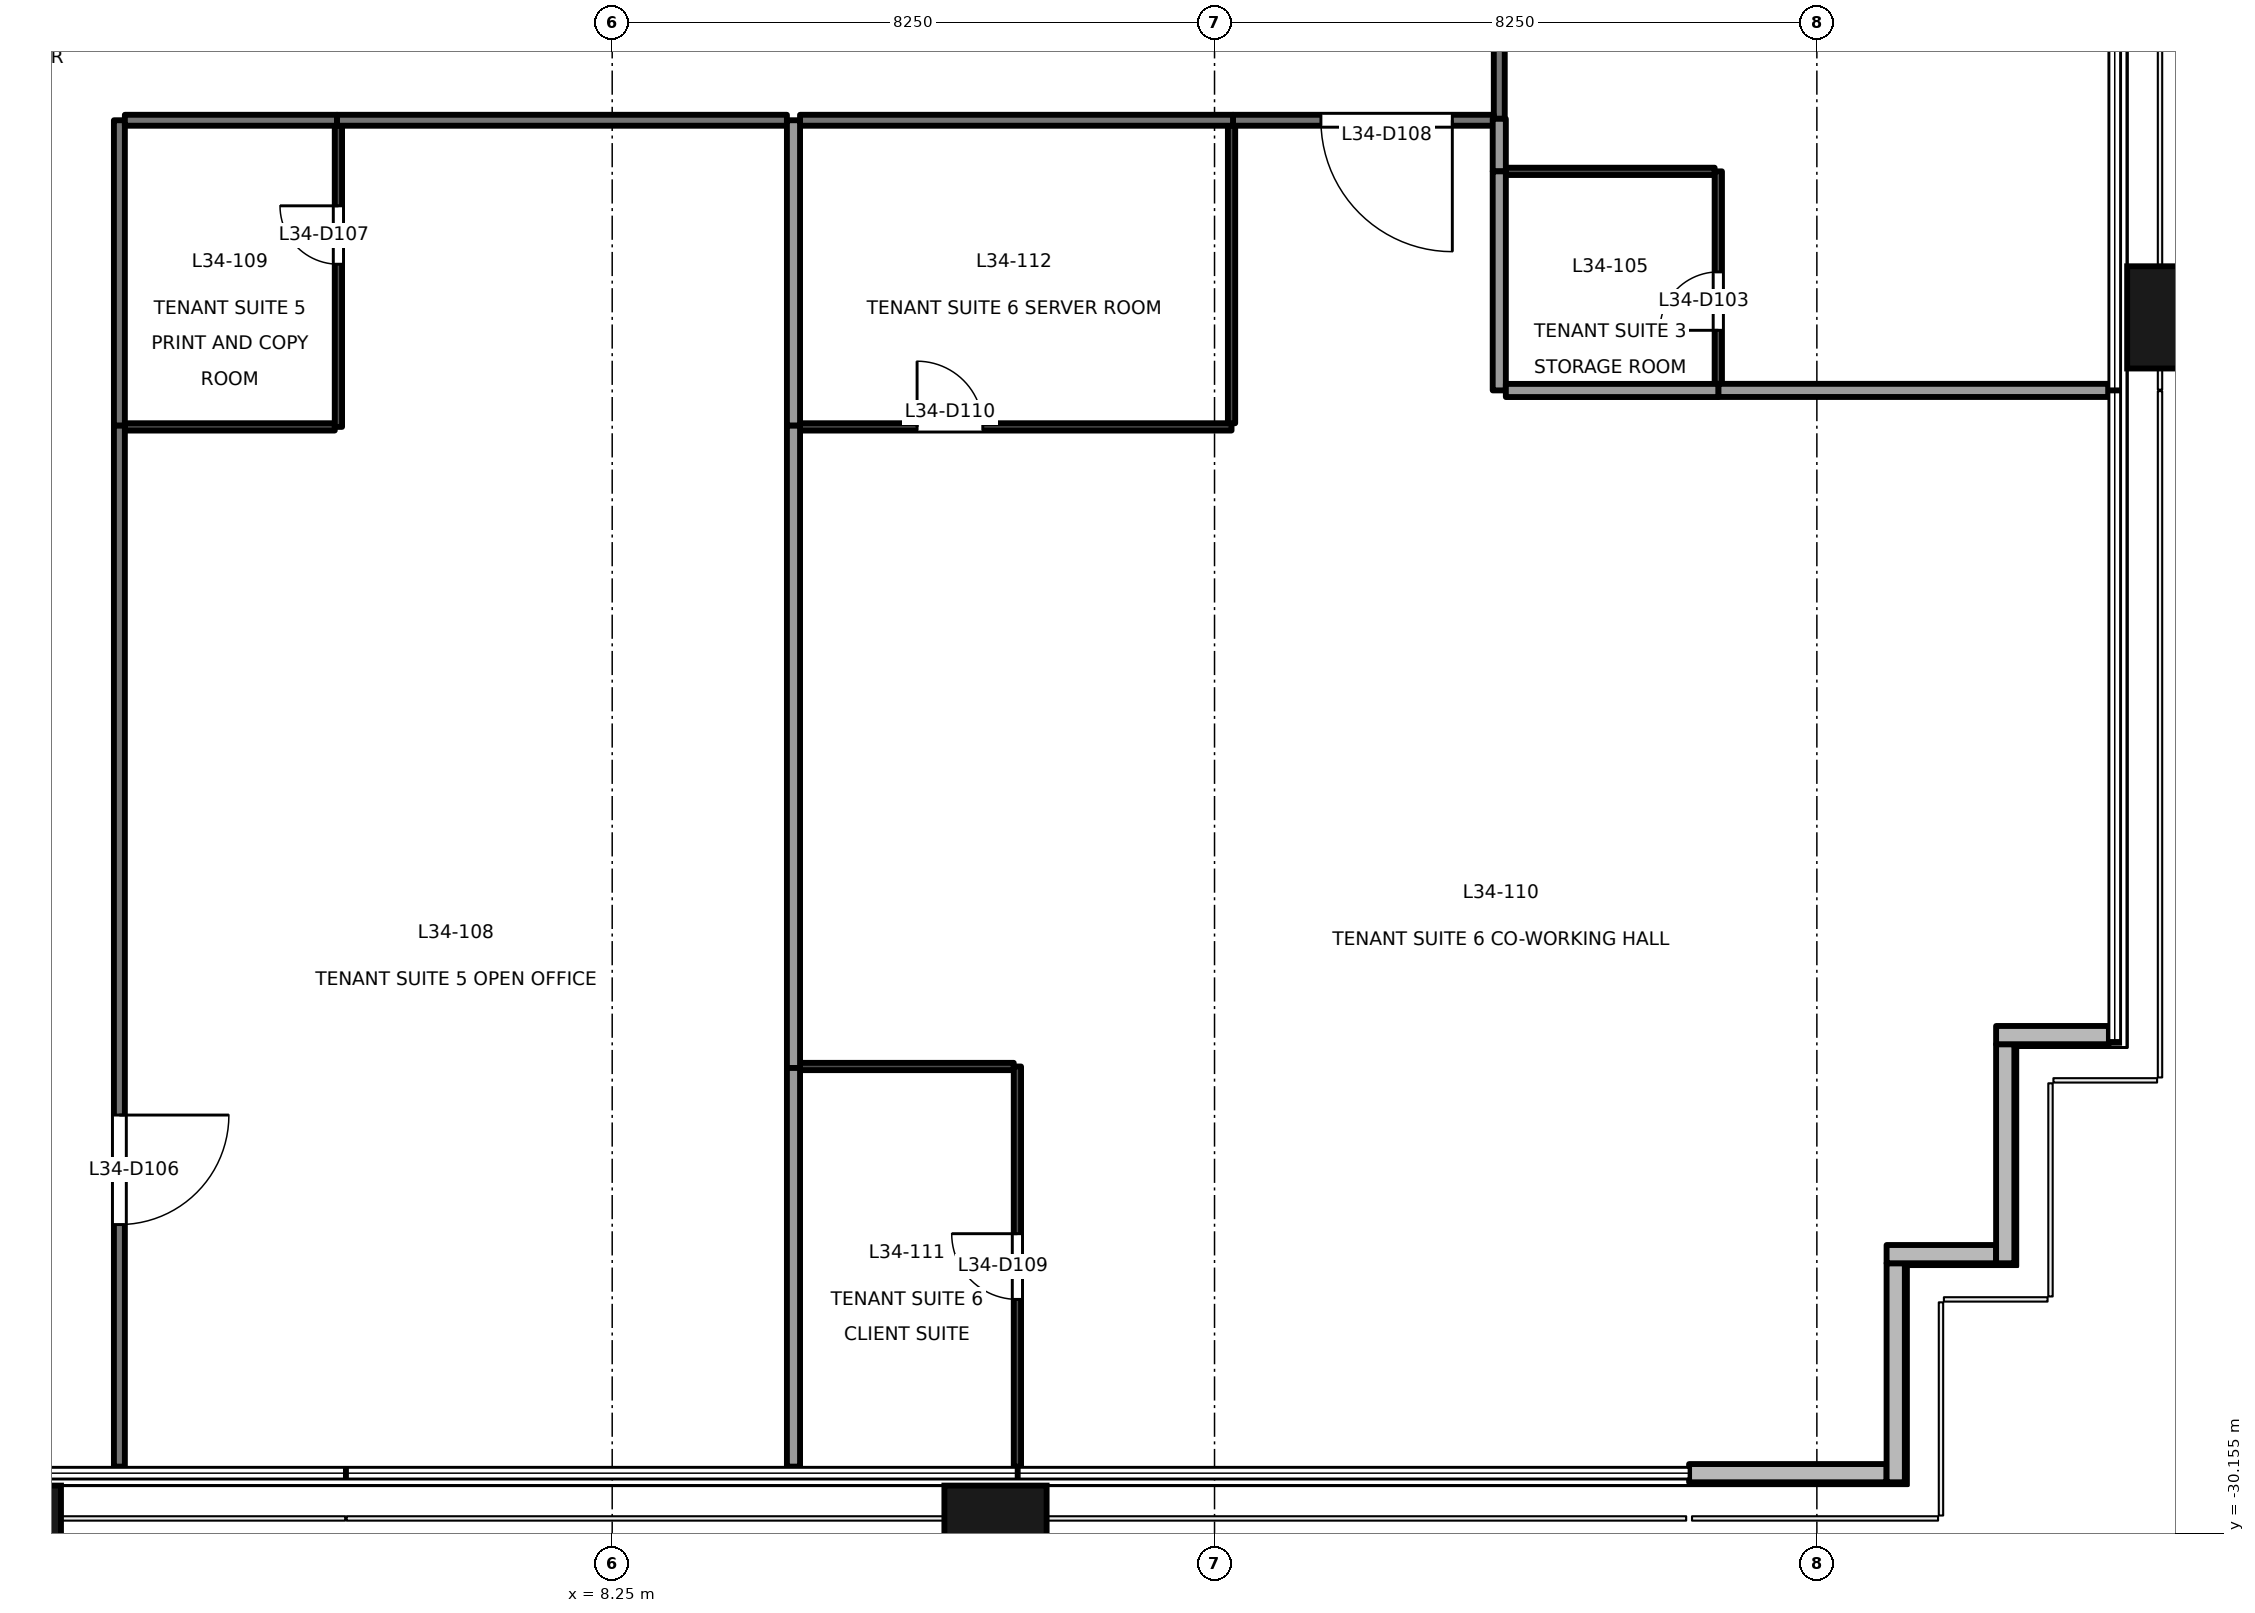
"""IFC4 building model, lengths in metres.
Left out: names, types, materials, properties, quantities, classifications, styles, units other than length and angle.
Written with IfcOpenShell. Run it as: python <this file> out.ifc"""

import sys

from ifc_helpers import new_model, si_unit, direction, frame, frame_2d, origin, origin_2d, place, context, subcontext, project, spatial, rectangle, extrude, element, fill, save


model = new_model("IFC4")
c1 = context("Model", 3, precision=1e-05, world=origin(), true_north=direction((0.0, 1.0)))
c2 = subcontext(c1, "Body", "Model", "MODEL_VIEW")
j1 = project(units=[si_unit("LENGTHUNIT", "METRE"), si_unit("PLANEANGLEUNIT", "RADIAN")], contexts=[c1])
p1 = place(None, origin())
s1 = spatial("IfcSite", under=j1, at=p1, CompositionType="ELEMENT")
p2 = place(p1, origin())
s2 = spatial("IfcBuilding", under=s1, at=p2, CompositionType="ELEMENT")
p3 = place(p2, frame((0.0, 0.0, 150.1)))
s3 = spatial("IfcBuildingStorey", under=s2, at=p3, CompositionType="ELEMENT", Elevation=150.1)
for number, where, z_axis, x_axis in (
    (1, (0.0, -30.4, -0.2), (0.0, 0.0, 1.0), (1.0, 0.0, 0.0)),
    (2, (13.5, -30.4, -0.2), (0.0, 0.0, 1.0), (1.0, 0.0, 0.0)),
    (3, (29.9, -13.5, -0.2), (0.0, 0.0, 1.0), (0.0, 1.0, 0.0)),
):
    element("IfcColumn", number, at=place(p3, frame(where, z_axis=z_axis, x_axis=x_axis)), inside=s3, PredefinedType="COLUMN", context=c2, shape_type="SweptSolid", body=[
        extrude(rectangle(XDim=1.4, YDim=1.8, at=origin_2d()), origin(), (0.0, 0.0, 1.0), 4.0),
    ])
p4 = place(p3, frame((23.0, -29.33, 0.0), z_axis=(0.0, 0.0, 1.0), x_axis=(1.0, 0.0, 0.0)))
e4 = element("IfcWall", 4, at=p4, inside=s3, PredefinedType="SOLIDWALL", context=c2, shape_type="SweptSolid", body=[
    extrude(rectangle(XDim=2.705, YDim=0.25, at=frame_2d((1.353, 0.0))), origin(), (0.0, 0.0, 1.0), 3.8),
])
p5 = place(p3, frame((25.83, -29.455, 0.0), z_axis=(0.0, 0.0, 1.0), x_axis=(0.0, 1.0, 0.0)))
e5 = element("IfcWall", 5, at=p5, inside=s3, PredefinedType="SOLIDWALL", context=c2, shape_type="SweptSolid", body=[
    extrude(rectangle(XDim=3.0, YDim=0.25, at=frame_2d((1.5, 0.0))), origin(), (0.0, 0.0, 1.0), 3.8),
])
p6 = place(p3, frame((25.705, -26.33, 0.0), z_axis=(0.0, 0.0, 1.0), x_axis=(1.0, 0.0, 0.0)))
e6 = element("IfcWall", 6, at=p6, inside=s3, PredefinedType="SOLIDWALL", context=c2, shape_type="SweptSolid", body=[
    extrude(rectangle(XDim=1.5, YDim=0.25, at=frame_2d((0.75, 0.0))), origin(), (0.0, 0.0, 1.0), 3.8),
])
p7 = place(p3, frame((27.33, -26.455, 0.0), z_axis=(0.0, 0.0, 1.0), x_axis=(0.0, 1.0, 0.0)))
e7 = element("IfcWall", 7, at=p7, inside=s3, PredefinedType="SOLIDWALL", context=c2, shape_type="SweptSolid", body=[
    extrude(rectangle(XDim=3.0, YDim=0.25, at=frame_2d((1.5, 0.0))), origin(), (0.0, 0.0, 1.0), 3.8),
])
p8 = place(p3, frame((27.205, -23.33, 0.0), z_axis=(0.0, 0.0, 1.0), x_axis=(1.0, 0.0, 0.0)))
e8 = element("IfcWall", 8, at=p8, inside=s3, PredefinedType="SOLIDWALL", context=c2, shape_type="SweptSolid", body=[
    extrude(rectangle(XDim=1.545, YDim=0.25, at=frame_2d((0.772, 0.0))), origin(), (0.0, 0.0, 1.0), 3.8),
])
p9 = place(p3, frame((20.4, -5.59, 0.0), z_axis=(0.0, 0.0, 1.0), x_axis=(0.0, -1.0, 0.0)))
e9 = element("IfcWall", 9, at=p9, inside=s3, PredefinedType="PARTITIONING", context=c2, shape_type="SweptSolid", body=[
    extrude(rectangle(XDim=5.19, YDim=0.15, at=frame_2d((2.595, 0.0))), origin(), (0.0, 0.0, 1.0), 3.8),
])
p10 = place(p9, frame((1.198, 0.0, 0.0)))
e10 = element("IfcOpeningElement", 10, at=p10, cuts=e9, PredefinedType="OPENING", context=c2, shape_type="SweptSolid", body=[
    extrude(rectangle(XDim=0.9, YDim=2.1, at=frame_2d((0.45, 1.05))), frame((0.0, 0.085, 0.0), z_axis=(0.0, -1.0, 0.0), x_axis=(1.0, 0.0, 0.0)), (0.0, 0.0, 1.0), 0.171),
])
p11 = place(p3, frame((1.5, -14.98, 0.0), z_axis=(0.0, 0.0, 1.0), x_axis=(0.0, -1.0, 0.0)))
e11 = element("IfcWall", 11, at=p11, inside=s3, PredefinedType="PARTITIONING", context=c2, shape_type="SweptSolid", body=[
    extrude(rectangle(XDim=14.26, YDim=0.15, at=frame_2d((7.13, 0.0))), origin(), (0.0, 0.0, 1.0), 3.8),
])
p12 = place(p11, frame((9.445, 0.0, 0.0)))
e12 = element("IfcOpeningElement", 12, at=p12, cuts=e11, PredefinedType="OPENING", context=c2, shape_type="SweptSolid", body=[
    extrude(rectangle(XDim=1.5, YDim=2.1, at=frame_2d((0.75, 1.05))), frame((0.0, 0.085, 0.0), z_axis=(0.0, -1.0, 0.0), x_axis=(1.0, 0.0, 0.0)), (0.0, 0.0, 1.0), 0.171),
])
p13 = place(p3, frame((10.643, -10.8, 0.0), z_axis=(0.0, 0.0, 1.0), x_axis=(-1.0, 0.0, 0.0)))
e13 = element("IfcWall", 13, at=p13, inside=s3, PredefinedType="PARTITIONING", context=c2, shape_type="SweptSolid", body=[
    extrude(rectangle(XDim=6.163, YDim=0.15, at=frame_2d((3.082, 0.0))), origin(), (0.0, 0.0, 1.0), 2.9),
])
p14 = place(p3, frame((1.5, -10.8, 0.0), z_axis=(0.0, 0.0, 1.0), x_axis=(0.0, -1.0, 0.0)))
e14 = element("IfcWall", 14, at=p14, inside=s3, PredefinedType="PARTITIONING", context=c2, shape_type="SweptSolid", body=[
    extrude(rectangle(XDim=4.18, YDim=0.15, at=frame_2d((2.09, 0.0))), origin(), (0.0, 0.0, 1.0), 3.8),
])
p15 = place(p3, frame((4.48, -10.8, 0.0), z_axis=(0.0, 0.0, 1.0), x_axis=(-1.0, 0.0, 0.0)))
e15 = element("IfcWall", 15, at=p15, inside=s3, PredefinedType="PARTITIONING", context=c2, shape_type="SweptSolid", body=[
    extrude(rectangle(XDim=2.905, YDim=0.15, at=frame_2d((1.453, 0.0))), origin(), (0.0, 0.0, 1.0), 2.9),
])
p16 = place(p3, frame((20.325, -10.8, 0.0), z_axis=(0.0, 0.0, 1.0), x_axis=(-1.0, 0.0, 0.0)))
e16 = element("IfcWall", 16, at=p16, inside=s3, PredefinedType="PARTITIONING", context=c2, shape_type="SweptSolid", body=[
    extrude(rectangle(XDim=3.572, YDim=0.15, at=frame_2d((1.786, 0.0))), origin(), (0.0, 0.0, 1.0), 3.8),
])
p17 = place(p16, frame((0.568, 0.0, 0.0)))
e17 = element("IfcOpeningElement", 17, at=p17, cuts=e16, PredefinedType="OPENING", context=c2, shape_type="SweptSolid", body=[
    extrude(rectangle(XDim=1.8, YDim=2.1, at=frame_2d((0.9, 1.05))), frame((0.0, 0.085, 0.0), z_axis=(0.0, -1.0, 0.0), x_axis=(1.0, 0.0, 0.0)), (0.0, 0.0, 1.0), 0.171),
])
p18 = place(p3, frame((16.753, -10.8, 0.0), z_axis=(0.0, 0.0, 1.0), x_axis=(-1.0, 0.0, 0.0)))
e18 = element("IfcWall", 18, at=p18, inside=s3, PredefinedType="PARTITIONING", context=c2, shape_type="SweptSolid", body=[
    extrude(rectangle(XDim=5.93, YDim=0.15, at=frame_2d((2.965, 0.0))), origin(), (0.0, 0.0, 1.0), 2.9),
])
p19 = place(p3, frame((23.35, -11.5, 0.0), z_axis=(0.0, 0.0, 1.0), x_axis=(-1.0, 0.0, 0.0)))
e19 = element("IfcWall", 19, at=p19, inside=s3, PredefinedType="PARTITIONING", context=c2, shape_type="SweptSolid", body=[
    extrude(rectangle(XDim=2.86, YDim=0.1, at=frame_2d((1.43, 0.0))), origin(), (0.0, 0.0, 1.0), 3.8),
])
p20 = place(p3, frame((23.4, -14.41, 0.0), z_axis=(0.0, 0.0, 1.0), x_axis=(0.0, 1.0, 0.0)))
e20 = element("IfcWall", 20, at=p20, inside=s3, PredefinedType="PARTITIONING", context=c2, shape_type="SweptSolid", body=[
    extrude(rectangle(XDim=2.91, YDim=0.1, at=frame_2d((1.455, 0.0))), origin(), (0.0, 0.0, 1.0), 3.8),
])
p21 = place(p20, frame((0.733, 0.0, 0.0)))
e21 = element("IfcOpeningElement", 21, at=p21, cuts=e20, PredefinedType="OPENING", context=c2, shape_type="SweptSolid", body=[
    extrude(rectangle(XDim=0.8, YDim=2.1, at=frame_2d((0.4, 1.05))), frame((0.0, 0.061, 0.0), z_axis=(0.0, -1.0, 0.0), x_axis=(1.0, 0.0, 0.0)), (0.0, 0.0, 1.0), 0.121),
])
p22 = place(p3, frame((20.4, -11.5, 0.0), z_axis=(0.0, 0.0, 1.0), x_axis=(0.0, 1.0, 0.0)))
e22 = element("IfcWall", 22, at=p22, inside=s3, PredefinedType="PARTITIONING", context=c2, shape_type="SweptSolid", body=[
    extrude(rectangle(XDim=0.72, YDim=0.18, at=frame_2d((0.36, 0.0))), origin(), (0.0, 0.0, 1.0), 3.8),
])
p23 = place(p3, frame((28.74, -14.5, 0.0), z_axis=(0.0, 0.0, 1.0), x_axis=(-1.0, 0.0, 0.0)))
e23 = element("IfcWall", 23, at=p23, inside=s3, PredefinedType="PARTITIONING", context=c2, shape_type="SweptSolid", body=[
    extrude(rectangle(XDim=5.34, YDim=0.18, at=frame_2d((2.67, 0.0))), origin(), (0.0, 0.0, 1.0), 3.8),
])
p24 = place(p3, frame((20.4, -14.5, 0.0), z_axis=(0.0, 0.0, 1.0), x_axis=(0.0, 1.0, 0.0)))
e24 = element("IfcWall", 24, at=p24, inside=s3, PredefinedType="PARTITIONING", context=c2, shape_type="SweptSolid", body=[
    extrude(rectangle(XDim=3.0, YDim=0.18, at=frame_2d((1.5, 0.0))), origin(), (0.0, 0.0, 1.0), 3.8),
])
p25 = place(p3, frame((23.4, -14.501, 0.0), z_axis=(0.0, 0.0, 1.0), x_axis=(-1.0, 0.0, 0.0)))
e25 = element("IfcWall", 25, at=p25, inside=s3, PredefinedType="PARTITIONING", context=c2, shape_type="SweptSolid", body=[
    extrude(rectangle(XDim=2.91, YDim=0.18, at=frame_2d((1.455, 0.0))), origin(), (0.0, 0.0, 1.0), 3.8),
])
p26 = place(p3, frame((1.575, -15.0, 0.0), z_axis=(0.0, 0.0, 1.0), x_axis=(1.0, 0.0, 0.0)))
e26 = element("IfcWall", 26, at=p26, inside=s3, PredefinedType="PARTITIONING", context=c2, shape_type="SweptSolid", body=[
    extrude(rectangle(XDim=2.875, YDim=0.1, at=frame_2d((1.438, 0.0))), origin(), (0.0, 0.0, 1.0), 2.9),
])
p27 = place(p3, frame((4.5, -15.0, 0.0), z_axis=(0.0, 0.0, 1.0), x_axis=(0.0, 1.0, 0.0)))
e27 = element("IfcWall", 27, at=p27, inside=s3, PredefinedType="PARTITIONING", context=c2, shape_type="SweptSolid", body=[
    extrude(rectangle(XDim=4.125, YDim=0.1, at=frame_2d((2.062, 0.0))), origin(), (0.0, 0.0, 1.0), 2.9),
])
p28 = place(p27, frame((2.228, 0.0, 0.0)))
e28 = element("IfcOpeningElement", 28, at=p28, cuts=e27, PredefinedType="OPENING", context=c2, shape_type="SweptSolid", body=[
    extrude(rectangle(XDim=0.8, YDim=2.1, at=frame_2d((0.4, 1.05))), frame((0.0, 0.061, 0.0), z_axis=(0.0, -1.0, 0.0), x_axis=(1.0, 0.0, 0.0)), (0.0, 0.0, 1.0), 0.121),
])
p29 = place(p3, frame((10.733, -14.98, 0.0), z_axis=(0.0, 0.0, 1.0), x_axis=(0.0, -1.0, 0.0)))
e29 = element("IfcWall", 29, at=p29, inside=s3, PredefinedType="PARTITIONING", context=c2, shape_type="SweptSolid", body=[
    extrude(rectangle(XDim=8.8, YDim=0.18, at=frame_2d((4.4, 0.0))), origin(), (0.0, 0.0, 1.0), 3.8),
])
p30 = place(p3, frame((10.733, -23.78, 0.0), z_axis=(0.0, 0.0, 1.0), x_axis=(0.0, -1.0, 0.0)))
e30 = element("IfcWall", 30, at=p30, inside=s3, PredefinedType="PARTITIONING", context=c2, shape_type="SweptSolid", body=[
    extrude(rectangle(XDim=5.46, YDim=0.18, at=frame_2d((2.73, 0.0))), origin(), (0.0, 0.0, 1.0), 3.8),
])
p31 = place(p3, frame((10.733, -10.8, 0.0), z_axis=(0.0, 0.0, 1.0), x_axis=(0.0, -1.0, 0.0)))
e31 = element("IfcWall", 31, at=p31, inside=s3, PredefinedType="PARTITIONING", context=c2, shape_type="SweptSolid", body=[
    extrude(rectangle(XDim=4.18, YDim=0.18, at=frame_2d((2.09, 0.0))), origin(), (0.0, 0.0, 1.0), 3.8),
])
p32 = place(p3, frame((13.75, -23.76, 0.0), z_axis=(0.0, 0.0, 1.0), x_axis=(-1.0, 0.0, 0.0)))
e32 = element("IfcWall", 32, at=p32, inside=s3, PredefinedType="PARTITIONING", context=c2, shape_type="SweptSolid", body=[
    extrude(rectangle(XDim=2.927, YDim=0.1, at=frame_2d((1.463, 0.0))), origin(), (0.0, 0.0, 1.0), 2.9),
])
p33 = place(p3, frame((13.8, -29.24, 0.0), z_axis=(0.0, 0.0, 1.0), x_axis=(0.0, 1.0, 0.0)))
e33 = element("IfcWall", 33, at=p33, inside=s3, PredefinedType="PARTITIONING", context=c2, shape_type="SweptSolid", body=[
    extrude(rectangle(XDim=5.48, YDim=0.1, at=frame_2d((2.74, 0.0))), origin(), (0.0, 0.0, 1.0), 3.8),
])
p34 = place(p33, frame((2.29, 0.0, 0.0)))
e34 = element("IfcOpeningElement", 34, at=p34, cuts=e33, PredefinedType="OPENING", context=c2, shape_type="SweptSolid", body=[
    extrude(rectangle(XDim=0.9, YDim=2.1, at=frame_2d((0.45, 1.05))), frame((0.0, 0.061, 0.0), z_axis=(0.0, -1.0, 0.0), x_axis=(1.0, 0.0, 0.0)), (0.0, 0.0, 1.0), 0.121),
])
p35 = place(p3, frame((10.823, -15.0, 0.0), z_axis=(0.0, 0.0, 1.0), x_axis=(1.0, 0.0, 0.0)))
e35 = element("IfcWall", 35, at=p35, inside=s3, PredefinedType="PARTITIONING", context=c2, shape_type="SweptSolid", body=[
    extrude(rectangle(XDim=5.91, YDim=0.1, at=frame_2d((2.955, 0.0))), origin(), (0.0, 0.0, 1.0), 2.9),
])
p36 = place(p35, frame((1.603, 0.0, 0.0)))
e36 = element("IfcOpeningElement", 36, at=p36, cuts=e35, PredefinedType="OPENING", context=c2, shape_type="SweptSolid", body=[
    extrude(rectangle(XDim=0.9, YDim=2.1, at=frame_2d((0.45, 1.05))), frame((0.0, 0.061, 0.0), z_axis=(0.0, -1.0, 0.0), x_axis=(1.0, 0.0, 0.0)), (0.0, 0.0, 1.0), 0.121),
])
p37 = place(p3, frame((16.733, -14.95, 0.0), z_axis=(0.0, 0.0, 1.0), x_axis=(0.0, 1.0, 0.0)))
e37 = element("IfcWall", 37, at=p37, inside=s3, PredefinedType="PARTITIONING", context=c2, shape_type="SweptSolid", body=[
    extrude(rectangle(XDim=4.075, YDim=0.1, at=frame_2d((2.038, 0.0))), origin(), (0.0, 0.0, 1.0), 3.8),
])
p38 = place(p21, origin())
e38 = element("IfcDoor", 38, at=p38, inside=s3, OperationType="SINGLE_SWING_LEFT", PredefinedType="DOOR", context=c2, shape_type="SweptSolid", body=[
    extrude(rectangle(XDim=0.8, YDim=2.1, at=frame_2d((0.4, 1.05))), frame((0.0, 0.025, 0.0), z_axis=(0.0, -1.0, 0.0), x_axis=(1.0, 0.0, 0.0)), (0.0, 0.0, 1.0), 0.05),
])
fill(e21, e38)
p39 = place(p12, origin())
e39 = element("IfcDoor", 39, at=p39, inside=s3, OperationType="DOUBLE_DOOR_SINGLE_SWING", PredefinedType="DOOR", context=c2, shape_type="SweptSolid", body=[
    extrude(rectangle(XDim=1.5, YDim=2.1, at=frame_2d((0.75, 1.05))), frame((0.0, 0.025, 0.0), z_axis=(0.0, -1.0, 0.0), x_axis=(1.0, 0.0, 0.0)), (0.0, 0.0, 1.0), 0.05),
])
fill(e12, e39)
p40 = place(p28, origin())
e40 = element("IfcDoor", 40, at=p40, inside=s3, OperationType="SINGLE_SWING_RIGHT", PredefinedType="DOOR", context=c2, shape_type="SweptSolid", body=[
    extrude(rectangle(XDim=0.8, YDim=2.1, at=frame_2d((0.4, 1.05))), frame((0.0, 0.025, 0.0), z_axis=(0.0, -1.0, 0.0), x_axis=(1.0, 0.0, 0.0)), (0.0, 0.0, 1.0), 0.05),
])
fill(e28, e40)
p41 = place(p17, origin())
e41 = element("IfcDoor", 41, at=p41, inside=s3, OperationType="DOUBLE_DOOR_SINGLE_SWING", PredefinedType="DOOR", context=c2, shape_type="SweptSolid", body=[
    extrude(rectangle(XDim=1.8, YDim=2.1, at=frame_2d((0.9, 1.05))), frame((0.0, 0.025, 0.0), z_axis=(0.0, -1.0, 0.0), x_axis=(1.0, 0.0, 0.0)), (0.0, 0.0, 1.0), 0.05),
])
fill(e17, e41)
p42 = place(p34, origin())
e42 = element("IfcDoor", 42, at=p42, inside=s3, OperationType="SINGLE_SWING_RIGHT", PredefinedType="DOOR", context=c2, shape_type="SweptSolid", body=[
    extrude(rectangle(XDim=0.9, YDim=2.1, at=frame_2d((0.45, 1.05))), frame((0.0, 0.025, 0.0), z_axis=(0.0, -1.0, 0.0), x_axis=(1.0, 0.0, 0.0)), (0.0, 0.0, 1.0), 0.05),
])
fill(e34, e42)
p43 = place(p36, origin())
e43 = element("IfcDoor", 43, at=p43, inside=s3, OperationType="SINGLE_SWING_LEFT", PredefinedType="DOOR", context=c2, shape_type="SweptSolid", body=[
    extrude(rectangle(XDim=0.9, YDim=2.1, at=frame_2d((0.45, 1.05))), frame((0.0, 0.025, 0.0), z_axis=(0.0, -1.0, 0.0), x_axis=(1.0, 0.0, 0.0)), (0.0, 0.0, 1.0), 0.05),
])
fill(e36, e43)
save(model, sys.argv[1])
